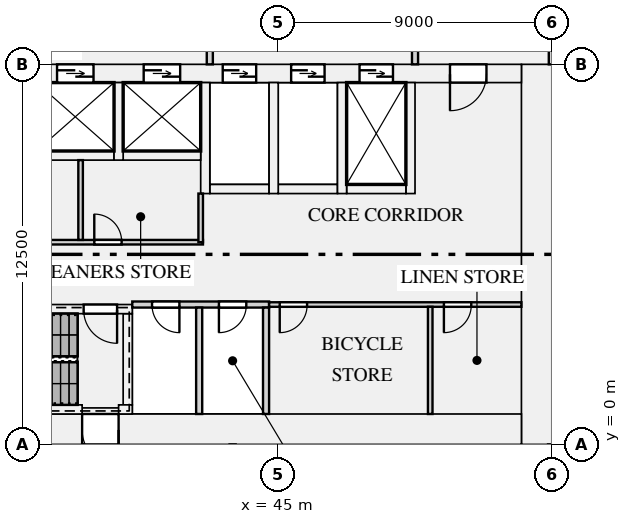
"""IFC4 building model, lengths in metres.
Left out: names, types, materials, properties, quantities, classifications, styles, units other than length and angle.
Written with IfcOpenShell. Run it as: python <this file> out.ifc"""

import sys

from ifc_helpers import new_model, si_unit, direction, frame, frame_2d, origin, place, context, subcontext, project, spatial, rectangle, extrude, element, fill, save


model = new_model("IFC4")
c1 = context("Model", 3, precision=1e-05, world=origin(), true_north=direction((0.0, 1.0)))
c2 = subcontext(c1, "Body", "Model", "MODEL_VIEW")
j1 = project(units=[si_unit("LENGTHUNIT", "METRE"), si_unit("PLANEANGLEUNIT", "RADIAN")], contexts=[c1])
p1 = place(None, origin())
s1 = spatial("IfcSite", under=j1, at=p1, CompositionType="ELEMENT")
p2 = place(p1, origin())
s2 = spatial("IfcBuilding", under=s1, at=p2, CompositionType="ELEMENT")
p3 = place(p2, origin())
s3 = spatial("IfcBuildingStorey", under=s2, at=p3, CompositionType="ELEMENT", Elevation=0.0)
p4 = place(p3, frame((53.5, 0.0, 0.0), z_axis=(0.0, 0.0, 1.0), x_axis=(0.0, 1.0, 0.0)))
e1 = element("IfcWall", 1, at=p4, inside=s3, PredefinedType="SHEAR", context=c2, shape_type="SweptSolid", body=[
    extrude(rectangle(XDim=12.5, YDim=1.0, at=frame_2d((6.25, 0.0))), origin(), (0.0, 0.0, 1.0), 6.5),
])
p5 = place(p3, frame((19.0, 0.5, 0.0), z_axis=(0.0, 0.0, 1.0), x_axis=(1.0, 0.0, 0.0)))
e2 = element("IfcWall", 2, at=p5, inside=s3, PredefinedType="SHEAR", context=c2, shape_type="SweptSolid", body=[
    extrude(rectangle(XDim=34.0, YDim=1.0, at=frame_2d((17.0, 0.0))), origin(), (0.0, 0.0, 1.0), 6.5),
])
p6 = place(p5, frame((19.55, 0.0, 0.0)))
e3 = element("IfcOpeningElement", 3, at=p6, cuts=e2, PredefinedType="OPENING", context=c2, shape_type="SweptSolid", body=[
    extrude(rectangle(XDim=1.2, YDim=2.1, at=frame_2d((0.6, 1.05))), frame((0.0, 0.51, 0.0), z_axis=(0.0, -1.0, 0.0), x_axis=(1.0, 0.0, 0.0)), (0.0, 0.0, 1.0), 1.02),
])
p7 = place(p3, frame((19.0, 12.2, 0.0), z_axis=(0.0, 0.0, 1.0), x_axis=(1.0, 0.0, 0.0)))
e4 = element("IfcWall", 4, at=p7, inside=s3, PredefinedType="SHEAR", context=c2, shape_type="SweptSolid", body=[
    extrude(rectangle(XDim=34.0, YDim=0.6, at=frame_2d((17.0, 0.0))), origin(), (0.0, 0.0, 1.0), 6.5),
])
p8 = place(p7, frame((4.475, 0.0, 0.0)))
e5 = element("IfcOpeningElement", 5, at=p8, cuts=e4, PredefinedType="OPENING", context=c2, shape_type="SweptSolid", body=[
    extrude(rectangle(XDim=1.2, YDim=2.1, at=frame_2d((0.6, 1.05))), frame((0.0, 0.31, 0.0), z_axis=(0.0, -1.0, 0.0), x_axis=(1.0, 0.0, 0.0)), (0.0, 0.0, 1.0), 0.62),
])
p9 = place(p7, frame((7.325, 0.0, 0.0)))
e6 = element("IfcOpeningElement", 6, at=p9, cuts=e4, PredefinedType="OPENING", context=c2, shape_type="SweptSolid", body=[
    extrude(rectangle(XDim=1.2, YDim=2.1, at=frame_2d((0.6, 1.05))), frame((0.0, 0.31, 0.0), z_axis=(0.0, -1.0, 0.0), x_axis=(1.0, 0.0, 0.0)), (0.0, 0.0, 1.0), 0.62),
])
p10 = place(p7, frame((10.175, 0.0, 0.0)))
e7 = element("IfcOpeningElement", 7, at=p10, cuts=e4, PredefinedType="OPENING", context=c2, shape_type="SweptSolid", body=[
    extrude(rectangle(XDim=1.2, YDim=2.1, at=frame_2d((0.6, 1.05))), frame((0.0, 0.31, 0.0), z_axis=(0.0, -1.0, 0.0), x_axis=(1.0, 0.0, 0.0)), (0.0, 0.0, 1.0), 0.62),
])
p11 = place(p7, frame((13.025, 0.0, 0.0)))
e8 = element("IfcOpeningElement", 8, at=p11, cuts=e4, PredefinedType="OPENING", context=c2, shape_type="SweptSolid", body=[
    extrude(rectangle(XDim=1.2, YDim=2.1, at=frame_2d((0.6, 1.05))), frame((0.0, 0.31, 0.0), z_axis=(0.0, -1.0, 0.0), x_axis=(1.0, 0.0, 0.0)), (0.0, 0.0, 1.0), 0.62),
])
p12 = place(p7, frame((15.875, 0.0, 0.0)))
e9 = element("IfcOpeningElement", 9, at=p12, cuts=e4, PredefinedType="OPENING", context=c2, shape_type="SweptSolid", body=[
    extrude(rectangle(XDim=1.2, YDim=2.1, at=frame_2d((0.6, 1.05))), frame((0.0, 0.31, 0.0), z_axis=(0.0, -1.0, 0.0), x_axis=(1.0, 0.0, 0.0)), (0.0, 0.0, 1.0), 0.62),
])
p13 = place(p7, frame((18.725, 0.0, 0.0)))
e10 = element("IfcOpeningElement", 10, at=p13, cuts=e4, PredefinedType="OPENING", context=c2, shape_type="SweptSolid", body=[
    extrude(rectangle(XDim=1.2, YDim=2.1, at=frame_2d((0.6, 1.05))), frame((0.0, 0.31, 0.0), z_axis=(0.0, -1.0, 0.0), x_axis=(1.0, 0.0, 0.0)), (0.0, 0.0, 1.0), 0.62),
])
p14 = place(p7, frame((21.575, 0.0, 0.0)))
e11 = element("IfcOpeningElement", 11, at=p14, cuts=e4, PredefinedType="OPENING", context=c2, shape_type="SweptSolid", body=[
    extrude(rectangle(XDim=1.2, YDim=2.1, at=frame_2d((0.6, 1.05))), frame((0.0, 0.31, 0.0), z_axis=(0.0, -1.0, 0.0), x_axis=(1.0, 0.0, 0.0)), (0.0, 0.0, 1.0), 0.62),
])
p15 = place(p7, frame((24.175, 0.0, 0.0)))
e12 = element("IfcOpeningElement", 12, at=p15, cuts=e4, PredefinedType="OPENING", context=c2, shape_type="SweptSolid", body=[
    extrude(rectangle(XDim=1.1, YDim=2.1, at=frame_2d((0.55, 1.05))), frame((0.0, 0.31, 0.0), z_axis=(0.0, -1.0, 0.0), x_axis=(1.0, 0.0, 0.0)), (0.0, 0.0, 1.0), 0.62),
])
p16 = place(p7, frame((26.425, 0.0, 0.0)))
e13 = element("IfcOpeningElement", 13, at=p16, cuts=e4, PredefinedType="OPENING", context=c2, shape_type="SweptSolid", body=[
    extrude(rectangle(XDim=1.1, YDim=2.1, at=frame_2d((0.55, 1.05))), frame((0.0, 0.31, 0.0), z_axis=(0.0, -1.0, 0.0), x_axis=(1.0, 0.0, 0.0)), (0.0, 0.0, 1.0), 0.62),
])
p17 = place(p7, frame((28.675, 0.0, 0.0)))
e14 = element("IfcOpeningElement", 14, at=p17, cuts=e4, PredefinedType="OPENING", context=c2, shape_type="SweptSolid", body=[
    extrude(rectangle(XDim=1.1, YDim=2.1, at=frame_2d((0.55, 1.05))), frame((0.0, 0.31, 0.0), z_axis=(0.0, -1.0, 0.0), x_axis=(1.0, 0.0, 0.0)), (0.0, 0.0, 1.0), 0.62),
])
p18 = place(p7, frame((1.15, 0.0, 0.0)))
e15 = element("IfcOpeningElement", 15, at=p18, cuts=e4, PredefinedType="OPENING", context=c2, shape_type="SweptSolid", body=[
    extrude(rectangle(XDim=1.2, YDim=2.1, at=frame_2d((0.6, 1.05))), frame((0.0, 0.31, 0.0), z_axis=(0.0, -1.0, 0.0), x_axis=(1.0, 0.0, 0.0)), (0.0, 0.0, 1.0), 0.62),
])
p19 = place(p7, frame((31.65, 0.0, 0.0)))
e16 = element("IfcOpeningElement", 16, at=p19, cuts=e4, PredefinedType="OPENING", context=c2, shape_type="SweptSolid", body=[
    extrude(rectangle(XDim=1.2, YDim=2.1, at=frame_2d((0.6, 1.05))), frame((0.0, 0.31, 0.0), z_axis=(0.0, -1.0, 0.0), x_axis=(1.0, 0.0, 0.0)), (0.0, 0.0, 1.0), 0.62),
])
for number, where, z_axis, x_axis in (
    (17, (37.05, 9.5, 0.0), (0.0, 0.0, 1.0), (1.0, 0.0, 0.0)),
    (18, (39.9, 9.5, 0.0), (0.0, 0.0, 1.0), (1.0, 0.0, 0.0)),
):
    element("IfcWall", number, at=place(p3, frame(where, z_axis=z_axis, x_axis=x_axis)), inside=s3, PredefinedType="SHEAR", context=c2, shape_type="SweptSolid", body=[
        extrude(rectangle(XDim=2.55, YDim=0.3, at=frame_2d((1.275, 0.0))), origin(), (0.0, 0.0, 1.0), 6.5),
    ])
p20 = place(p3, frame((39.75, 9.35, 0.0), z_axis=(0.0, 0.0, 1.0), x_axis=(0.0, 1.0, 0.0)))
e19 = element("IfcWall", 19, at=p20, inside=s3, PredefinedType="SHEAR", context=c2, shape_type="SweptSolid", body=[
    extrude(rectangle(XDim=2.55, YDim=0.3, at=frame_2d((1.275, 0.0))), origin(), (0.0, 0.0, 1.0), 6.5),
])
p21 = place(p3, frame((42.75, 8.4, 0.0), z_axis=(0.0, 0.0, 1.0), x_axis=(1.0, 0.0, 0.0)))
e20 = element("IfcWall", 20, at=p21, inside=s3, PredefinedType="SHEAR", context=c2, shape_type="SweptSolid", body=[
    extrude(rectangle(XDim=1.95, YDim=0.3, at=frame_2d((0.975, 0.0))), origin(), (0.0, 0.0, 1.0), 6.5),
])
p22 = place(p3, frame((42.6, 8.25, 0.0), z_axis=(0.0, 0.0, 1.0), x_axis=(0.0, 1.0, 0.0)))
e21 = element("IfcWall", 21, at=p22, inside=s3, PredefinedType="SHEAR", context=c2, shape_type="SweptSolid", body=[
    extrude(rectangle(XDim=3.65, YDim=0.3, at=frame_2d((1.825, 0.0))), origin(), (0.0, 0.0, 1.0), 6.5),
])
p23 = place(p3, frame((45.0, 8.4, 0.0), z_axis=(0.0, 0.0, 1.0), x_axis=(1.0, 0.0, 0.0)))
e22 = element("IfcWall", 22, at=p23, inside=s3, PredefinedType="SHEAR", context=c2, shape_type="SweptSolid", body=[
    extrude(rectangle(XDim=1.95, YDim=0.3, at=frame_2d((0.975, 0.0))), origin(), (0.0, 0.0, 1.0), 6.5),
])
p24 = place(p3, frame((44.85, 8.25, 0.0), z_axis=(0.0, 0.0, 1.0), x_axis=(0.0, 1.0, 0.0)))
e23 = element("IfcWall", 23, at=p24, inside=s3, PredefinedType="SHEAR", context=c2, shape_type="SweptSolid", body=[
    extrude(rectangle(XDim=3.65, YDim=0.3, at=frame_2d((1.825, 0.0))), origin(), (0.0, 0.0, 1.0), 6.5),
])
p25 = place(p3, frame((47.25, 8.4, 0.0), z_axis=(0.0, 0.0, 1.0), x_axis=(1.0, 0.0, 0.0)))
e24 = element("IfcWall", 24, at=p25, inside=s3, PredefinedType="SHEAR", context=c2, shape_type="SweptSolid", body=[
    extrude(rectangle(XDim=1.95, YDim=0.3, at=frame_2d((0.975, 0.0))), origin(), (0.0, 0.0, 1.0), 6.5),
])
for number, where, z_axis, x_axis in (
    (25, (47.1, 8.25, 0.0), (0.0, 0.0, 1.0), (0.0, 1.0, 0.0)),
    (26, (49.35, 8.25, 0.0), (0.0, 0.0, 1.0), (0.0, 1.0, 0.0)),
):
    element("IfcWall", number, at=place(p3, frame(where, z_axis=z_axis, x_axis=x_axis)), inside=s3, PredefinedType="SHEAR", context=c2, shape_type="SweptSolid", body=[
        extrude(rectangle(XDim=3.65, YDim=0.3, at=frame_2d((1.825, 0.0))), origin(), (0.0, 0.0, 1.0), 6.5),
    ])
p26 = place(p3, frame((31.8, 1.15, 0.0), z_axis=(0.0, 0.0, 1.0), x_axis=(1.0, 0.0, 0.0)))
e27 = element("IfcWall", 27, at=p26, inside=s3, PredefinedType="SHEAR", context=c2, shape_type="SweptSolid", body=[
    extrude(rectangle(XDim=6.75, YDim=0.3, at=frame_2d((3.375, 0.0))), origin(), (0.0, 0.0, 1.0), 6.5),
])
p27 = place(p3, frame((39.75, 1.15, 0.0), z_axis=(0.0, 0.0, 1.0), x_axis=(1.0, 0.0, 0.0)))
e28 = element("IfcWall", 28, at=p27, inside=s3, PredefinedType="SHEAR", context=c2, shape_type="SweptSolid", body=[
    extrude(rectangle(XDim=0.45, YDim=0.3, at=frame_2d((0.225, 0.0))), origin(), (0.0, 0.0, 1.0), 6.5),
])
p28 = place(p3, frame((31.8, 4.45, 0.0), z_axis=(0.0, 0.0, 1.0), x_axis=(1.0, 0.0, 0.0)))
e29 = element("IfcWall", 29, at=p28, inside=s3, PredefinedType="SHEAR", context=c2, shape_type="SweptSolid", body=[
    extrude(rectangle(XDim=8.4, YDim=0.3, at=frame_2d((4.2, 0.0))), origin(), (0.0, 0.0, 1.0), 6.5),
])
p29 = place(p28, frame((6.8, 0.0, 0.0)))
e30 = element("IfcOpeningElement", 30, at=p29, cuts=e29, PredefinedType="OPENING", context=c2, shape_type="SweptSolid", body=[
    extrude(rectangle(XDim=1.1, YDim=2.1, at=frame_2d((0.55, 1.05))), frame((0.0, 0.16, 0.0), z_axis=(0.0, -1.0, 0.0), x_axis=(1.0, 0.0, 0.0)), (0.0, 0.0, 1.0), 0.32),
])
p30 = place(p3, frame((40.05, 1.3, 0.0), z_axis=(0.0, 0.0, 1.0), x_axis=(0.0, 1.0, 0.0)))
e31 = element("IfcWall", 31, at=p30, inside=s3, PredefinedType="SHEAR", context=c2, shape_type="SweptSolid", body=[
    extrude(rectangle(XDim=3.0, YDim=0.3, at=frame_2d((1.5, 0.0))), origin(), (0.0, 0.0, 1.0), 6.5),
])
p31 = place(p3, frame((40.2, 4.6, 0.0), z_axis=(0.0, 0.0, 1.0), x_axis=(1.0, 0.0, 0.0)))
e32 = element("IfcWall", 32, at=p31, inside=s3, PredefinedType="PARTITIONING", context=c2, shape_type="SweptSolid", body=[
    extrude(rectangle(XDim=4.5, YDim=0.2, at=frame_2d((2.25, 0.0))), origin(), (0.0, 0.0, 1.0), 6.098),
])
p32 = place(p31, frame((0.65, 0.0, 0.0)))
e33 = element("IfcOpeningElement", 33, at=p32, cuts=e32, PredefinedType="OPENING", context=c2, shape_type="SweptSolid", body=[
    extrude(rectangle(XDim=0.9, YDim=2.1, at=frame_2d((0.45, 1.05))), frame((0.0, 0.11, 0.0), z_axis=(0.0, -1.0, 0.0), x_axis=(1.0, 0.0, 0.0)), (0.0, 0.0, 1.0), 0.22),
])
p33 = place(p31, frame((2.85, 0.0, 0.0)))
e34 = element("IfcOpeningElement", 34, at=p33, cuts=e32, PredefinedType="OPENING", context=c2, shape_type="SweptSolid", body=[
    extrude(rectangle(XDim=0.9, YDim=2.1, at=frame_2d((0.45, 1.05))), frame((0.0, 0.11, 0.0), z_axis=(0.0, -1.0, 0.0), x_axis=(1.0, 0.0, 0.0)), (0.0, 0.0, 1.0), 0.22),
])
p34 = place(p3, frame((44.7, 4.6, 0.0), z_axis=(0.0, 0.0, 1.0), x_axis=(1.0, 0.0, 0.0)))
e35 = element("IfcWall", 35, at=p34, inside=s3, PredefinedType="PARTITIONING", context=c2, shape_type="SweptSolid", body=[
    extrude(rectangle(XDim=8.3, YDim=0.15, at=frame_2d((4.15, 0.0))), origin(), (0.0, 0.0, 1.0), 6.098),
])
p35 = place(p34, frame((0.35, 0.0, 0.0)))
e36 = element("IfcOpeningElement", 36, at=p35, cuts=e35, PredefinedType="OPENING", context=c2, shape_type="SweptSolid", body=[
    extrude(rectangle(XDim=0.9, YDim=2.1, at=frame_2d((0.45, 1.05))), frame((0.0, 0.085, 0.0), z_axis=(0.0, -1.0, 0.0), x_axis=(1.0, 0.0, 0.0)), (0.0, 0.0, 1.0), 0.17),
])
p36 = place(p34, frame((5.75, 0.0, 0.0)))
e37 = element("IfcOpeningElement", 37, at=p36, cuts=e35, PredefinedType="OPENING", context=c2, shape_type="SweptSolid", body=[
    extrude(rectangle(XDim=0.9, YDim=2.1, at=frame_2d((0.45, 1.05))), frame((0.0, 0.085, 0.0), z_axis=(0.0, -1.0, 0.0), x_axis=(1.0, 0.0, 0.0)), (0.0, 0.0, 1.0), 0.17),
])
p37 = place(p3, frame((22.125, 6.65, 0.0), z_axis=(0.0, 0.0, 1.0), x_axis=(1.0, 0.0, 0.0)))
e38 = element("IfcWall", 38, at=p37, inside=s3, PredefinedType="PARTITIONING", context=c2, shape_type="SweptSolid", body=[
    extrude(rectangle(XDim=20.4, YDim=0.15, at=frame_2d((10.2, 0.0))), origin(), (0.0, 0.0, 1.0), 6.098),
])
p38 = place(p37, frame((0.525, 0.0, 0.0)))
e39 = element("IfcOpeningElement", 39, at=p38, cuts=e38, PredefinedType="OPENING", context=c2, shape_type="SweptSolid", body=[
    extrude(rectangle(XDim=0.9, YDim=2.1, at=frame_2d((0.45, 1.05))), frame((0.0, 0.085, 0.0), z_axis=(0.0, -1.0, 0.0), x_axis=(1.0, 0.0, 0.0)), (0.0, 0.0, 1.0), 0.17),
])
p39 = place(p37, frame((7.825, 0.0, 0.0)))
e40 = element("IfcOpeningElement", 40, at=p39, cuts=e38, PredefinedType="OPENING", context=c2, shape_type="SweptSolid", body=[
    extrude(rectangle(XDim=0.9, YDim=2.1, at=frame_2d((0.45, 1.05))), frame((0.0, 0.085, 0.0), z_axis=(0.0, -1.0, 0.0), x_axis=(1.0, 0.0, 0.0)), (0.0, 0.0, 1.0), 0.17),
])
p40 = place(p37, frame((11.825, 0.0, 0.0)))
e41 = element("IfcOpeningElement", 41, at=p40, cuts=e38, PredefinedType="OPENING", context=c2, shape_type="SweptSolid", body=[
    extrude(rectangle(XDim=0.9, YDim=2.1, at=frame_2d((0.45, 1.05))), frame((0.0, 0.085, 0.0), z_axis=(0.0, -1.0, 0.0), x_axis=(1.0, 0.0, 0.0)), (0.0, 0.0, 1.0), 0.17),
])
p41 = place(p37, frame((16.825, 0.0, 0.0)))
e42 = element("IfcOpeningElement", 42, at=p41, cuts=e38, PredefinedType="OPENING", context=c2, shape_type="SweptSolid", body=[
    extrude(rectangle(XDim=0.9, YDim=2.1, at=frame_2d((0.45, 1.05))), frame((0.0, 0.085, 0.0), z_axis=(0.0, -1.0, 0.0), x_axis=(1.0, 0.0, 0.0)), (0.0, 0.0, 1.0), 0.17),
])
for number, where, z_axis, x_axis in (
    (43, (42.4, 1.0, 0.0), (0.0, 0.0, 1.0), (0.0, 1.0, 0.0)),
    (44, (44.6, 1.0, 0.0), (0.0, 0.0, 1.0), (0.0, 1.0, 0.0)),
):
    element("IfcWall", number, at=place(p3, frame(where, z_axis=z_axis, x_axis=x_axis)), inside=s3, PredefinedType="PARTITIONING", context=c2, shape_type="SweptSolid", body=[
        extrude(rectangle(XDim=3.5, YDim=0.2, at=frame_2d((1.75, 0.0))), origin(), (0.0, 0.0, 1.0), 6.098),
    ])
p42 = place(p3, frame((50.0, 1.0, 0.0), z_axis=(0.0, 0.0, 1.0), x_axis=(0.0, 1.0, 0.0)))
e45 = element("IfcWall", 45, at=p42, inside=s3, PredefinedType="PARTITIONING", context=c2, shape_type="SweptSolid", body=[
    extrude(rectangle(XDim=3.525, YDim=0.15, at=frame_2d((1.762, 0.0))), origin(), (0.0, 0.0, 1.0), 6.098),
])
p43 = place(p3, frame((42.45, 6.65, 0.0), z_axis=(0.0, 0.0, 1.0), x_axis=(0.0, 1.0, 0.0)))
e46 = element("IfcWall", 46, at=p43, inside=s3, PredefinedType="PARTITIONING", context=c2, shape_type="SweptSolid", body=[
    extrude(rectangle(XDim=1.6, YDim=0.15, at=frame_2d((0.8, 0.0))), origin(), (0.0, 0.0, 1.0), 6.098),
])
p44 = place(p3, frame((38.5, 6.725, 0.0), z_axis=(0.0, 0.0, 1.0), x_axis=(0.0, 1.0, 0.0)))
e47 = element("IfcWall", 47, at=p44, inside=s3, PredefinedType="PARTITIONING", context=c2, shape_type="SweptSolid", body=[
    extrude(rectangle(XDim=2.625, YDim=0.15, at=frame_2d((1.312, 0.0))), origin(), (0.0, 0.0, 1.0), 6.098),
])
p45 = place(p3, frame((42.75, 12.5, 0.0), z_axis=(0.0, 0.0, 1.0), x_axis=(0.0, 1.0, 0.0)))
e48 = element("IfcWall", 48, at=p45, inside=s3, PredefinedType="PARTITIONING", context=c2, shape_type="SweptSolid", body=[
    extrude(rectangle(XDim=3.4, YDim=0.2, at=frame_2d((1.7, 0.0))), origin(), (0.0, 0.0, 1.0), 6.098),
])
p46 = place(p45, frame((2.2, 0.0, 0.0)))
e49 = element("IfcOpeningElement", 49, at=p46, cuts=e48, PredefinedType="OPENING", context=c2, shape_type="SweptSolid", body=[
    extrude(rectangle(XDim=1.0, YDim=2.1, at=frame_2d((0.5, 1.05))), frame((0.0, 0.11, 0.0), z_axis=(0.0, -1.0, 0.0), x_axis=(1.0, 0.0, 0.0)), (0.0, 0.0, 1.0), 0.22),
])
p47 = place(p3, frame((49.5, 12.5, 0.0), z_axis=(0.0, 0.0, 1.0), x_axis=(0.0, 1.0, 0.0)))
e50 = element("IfcWall", 50, at=p47, inside=s3, PredefinedType="PARTITIONING", context=c2, shape_type="SweptSolid", body=[
    extrude(rectangle(XDim=3.4, YDim=0.2, at=frame_2d((1.7, 0.0))), origin(), (0.0, 0.0, 1.0), 6.098),
])
p48 = place(p47, frame((1.15, 0.0, 0.0)))
e51 = element("IfcOpeningElement", 51, at=p48, cuts=e50, PredefinedType="OPENING", context=c2, shape_type="SweptSolid", body=[
    extrude(rectangle(XDim=1.1, YDim=2.1, at=frame_2d((0.55, 1.05))), frame((0.0, 0.11, 0.0), z_axis=(0.0, -1.0, 0.0), x_axis=(1.0, 0.0, 0.0)), (0.0, 0.0, 1.0), 0.22),
])
p49 = place(p3, frame((54.0, 12.5, 0.0), z_axis=(0.0, 0.0, 1.0), x_axis=(0.0, 1.0, 0.0)))
e52 = element("IfcWall", 52, at=p49, inside=s3, PredefinedType="PARTITIONING", context=c2, shape_type="SweptSolid", body=[
    extrude(rectangle(XDim=3.4, YDim=0.2, at=frame_2d((1.7, 0.0))), origin(), (0.0, 0.0, 1.0), 6.098),
])
p50 = place(p13, origin())
e53 = element("IfcDoor", 53, at=p50, inside=s3, OperationType="DOUBLE_DOOR_SLIDING", PredefinedType="DOOR", context=c2, shape_type="SweptSolid", body=[
    extrude(rectangle(XDim=1.2, YDim=2.1, at=frame_2d((0.6, 1.05))), frame((0.0, 0.025, 0.0), z_axis=(0.0, -1.0, 0.0), x_axis=(1.0, 0.0, 0.0)), (0.0, 0.0, 1.0), 0.05),
])
fill(e10, e53)
p51 = place(p14, origin())
e54 = element("IfcDoor", 54, at=p51, inside=s3, OperationType="DOUBLE_DOOR_SLIDING", PredefinedType="DOOR", context=c2, shape_type="SweptSolid", body=[
    extrude(rectangle(XDim=1.2, YDim=2.1, at=frame_2d((0.6, 1.05))), frame((0.0, 0.025, 0.0), z_axis=(0.0, -1.0, 0.0), x_axis=(1.0, 0.0, 0.0)), (0.0, 0.0, 1.0), 0.05),
])
fill(e11, e54)
p52 = place(p15, origin())
e55 = element("IfcDoor", 55, at=p52, inside=s3, OperationType="DOUBLE_DOOR_SLIDING", PredefinedType="DOOR", context=c2, shape_type="SweptSolid", body=[
    extrude(rectangle(XDim=1.1, YDim=2.1, at=frame_2d((0.55, 1.05))), frame((0.0, 0.025, 0.0), z_axis=(0.0, -1.0, 0.0), x_axis=(1.0, 0.0, 0.0)), (0.0, 0.0, 1.0), 0.05),
])
fill(e12, e55)
p53 = place(p16, origin())
e56 = element("IfcDoor", 56, at=p53, inside=s3, OperationType="DOUBLE_DOOR_SLIDING", PredefinedType="DOOR", context=c2, shape_type="SweptSolid", body=[
    extrude(rectangle(XDim=1.1, YDim=2.1, at=frame_2d((0.55, 1.05))), frame((0.0, 0.025, 0.0), z_axis=(0.0, -1.0, 0.0), x_axis=(1.0, 0.0, 0.0)), (0.0, 0.0, 1.0), 0.05),
])
fill(e13, e56)
p54 = place(p17, origin())
e57 = element("IfcDoor", 57, at=p54, inside=s3, OperationType="DOUBLE_DOOR_SLIDING", PredefinedType="DOOR", context=c2, shape_type="SweptSolid", body=[
    extrude(rectangle(XDim=1.1, YDim=2.1, at=frame_2d((0.55, 1.05))), frame((0.0, 0.025, 0.0), z_axis=(0.0, -1.0, 0.0), x_axis=(1.0, 0.0, 0.0)), (0.0, 0.0, 1.0), 0.05),
])
fill(e14, e57)
p55 = place(p29, frame((1.1, 0.0, 0.0), z_axis=(0.0, 0.0, 1.0), x_axis=(-1.0, 0.0, 0.0)))
e58 = element("IfcDoor", 58, at=p55, inside=s3, OperationType="SINGLE_SWING_LEFT", PredefinedType="DOOR", context=c2, shape_type="SweptSolid", body=[
    extrude(rectangle(XDim=1.1, YDim=2.1, at=frame_2d((0.55, 1.05))), frame((0.0, 0.025, 0.0), z_axis=(0.0, -1.0, 0.0), x_axis=(1.0, 0.0, 0.0)), (0.0, 0.0, 1.0), 0.05),
])
fill(e30, e58)
p56 = place(p41, origin())
e59 = element("IfcDoor", 59, at=p56, inside=s3, OperationType="SINGLE_SWING_LEFT", PredefinedType="DOOR", context=c2, shape_type="SweptSolid", body=[
    extrude(rectangle(XDim=0.9, YDim=2.1, at=frame_2d((0.45, 1.05))), frame((0.0, 0.025, 0.0), z_axis=(0.0, -1.0, 0.0), x_axis=(1.0, 0.0, 0.0)), (0.0, 0.0, 1.0), 0.05),
])
fill(e42, e59)
p57 = place(p35, frame((0.9, 0.0, 0.0), z_axis=(0.0, 0.0, 1.0), x_axis=(-1.0, 0.0, 0.0)))
e60 = element("IfcDoor", 60, at=p57, inside=s3, OperationType="SINGLE_SWING_RIGHT", PredefinedType="DOOR", context=c2, shape_type="SweptSolid", body=[
    extrude(rectangle(XDim=0.9, YDim=2.1, at=frame_2d((0.45, 1.05))), frame((0.0, 0.025, 0.0), z_axis=(0.0, -1.0, 0.0), x_axis=(1.0, 0.0, 0.0)), (0.0, 0.0, 1.0), 0.05),
])
fill(e36, e60)
p58 = place(p36, frame((0.9, 0.0, 0.0), z_axis=(0.0, 0.0, 1.0), x_axis=(-1.0, 0.0, 0.0)))
e61 = element("IfcDoor", 61, at=p58, inside=s3, OperationType="SINGLE_SWING_RIGHT", PredefinedType="DOOR", context=c2, shape_type="SweptSolid", body=[
    extrude(rectangle(XDim=0.9, YDim=2.1, at=frame_2d((0.45, 1.05))), frame((0.0, 0.025, 0.0), z_axis=(0.0, -1.0, 0.0), x_axis=(1.0, 0.0, 0.0)), (0.0, 0.0, 1.0), 0.05),
])
fill(e37, e61)
p59 = place(p32, frame((0.9, 0.0, 0.0), z_axis=(0.0, 0.0, 1.0), x_axis=(-1.0, 0.0, 0.0)))
e62 = element("IfcDoor", 62, at=p59, inside=s3, OperationType="SINGLE_SWING_LEFT", PredefinedType="DOOR", context=c2, shape_type="SweptSolid", body=[
    extrude(rectangle(XDim=0.9, YDim=2.1, at=frame_2d((0.45, 1.05))), frame((0.0, 0.025, 0.0), z_axis=(0.0, -1.0, 0.0), x_axis=(1.0, 0.0, 0.0)), (0.0, 0.0, 1.0), 0.05),
])
fill(e33, e62)
p60 = place(p33, frame((0.9, 0.0, 0.0), z_axis=(0.0, 0.0, 1.0), x_axis=(-1.0, 0.0, 0.0)))
e63 = element("IfcDoor", 63, at=p60, inside=s3, OperationType="SINGLE_SWING_RIGHT", PredefinedType="DOOR", context=c2, shape_type="SweptSolid", body=[
    extrude(rectangle(XDim=0.9, YDim=2.1, at=frame_2d((0.45, 1.05))), frame((0.0, 0.025, 0.0), z_axis=(0.0, -1.0, 0.0), x_axis=(1.0, 0.0, 0.0)), (0.0, 0.0, 1.0), 0.05),
])
fill(e34, e63)
p61 = place(p19, frame((1.2, 0.0, 0.0), z_axis=(0.0, 0.0, 1.0), x_axis=(-1.0, 0.0, 0.0)))
e64 = element("IfcDoor", 64, at=p61, inside=s3, OperationType="SINGLE_SWING_RIGHT", PredefinedType="DOOR", context=c2, shape_type="SweptSolid", body=[
    extrude(rectangle(XDim=1.2, YDim=2.1, at=frame_2d((0.6, 1.05))), frame((0.0, 0.025, 0.0), z_axis=(0.0, -1.0, 0.0), x_axis=(1.0, 0.0, 0.0)), (0.0, 0.0, 1.0), 0.05),
])
fill(e16, e64)
p62 = place(p6, frame((1.2, 0.0, 0.0), z_axis=(0.0, 0.0, 1.0), x_axis=(-1.0, 0.0, 0.0)))
e65 = element("IfcDoor", 65, at=p62, inside=s3, OperationType="SINGLE_SWING_LEFT", PredefinedType="DOOR", context=c2, shape_type="SweptSolid", body=[
    extrude(rectangle(XDim=1.2, YDim=2.1, at=frame_2d((0.6, 1.05))), frame((0.0, 0.025, 0.0), z_axis=(0.0, -1.0, 0.0), x_axis=(1.0, 0.0, 0.0)), (0.0, 0.0, 1.0), 0.05),
])
fill(e3, e65)
save(model, sys.argv[1])
